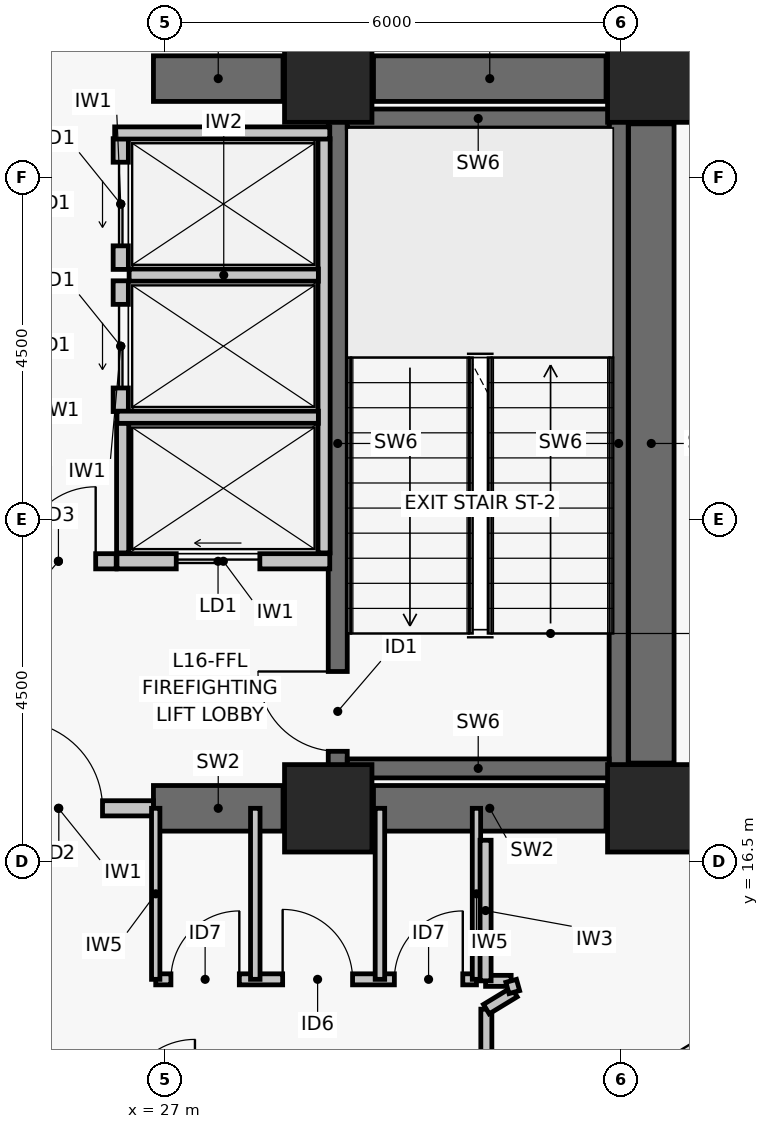
"""IFC4 building model, lengths in metres.
Left out: names, types, materials, properties, quantities, classifications, styles, units other than length and angle.
Written with IfcOpenShell. Run it as: python <this file> out.ifc"""

import sys

from ifc_helpers import new_model, si_unit, direction, frame, frame_2d, origin, origin_2d, place, context, subcontext, project, spatial, rectangle, extrude, element, fill, save


model = new_model("IFC4")
c1 = context("Model", 3, precision=1e-05, world=origin(), true_north=direction((0.0, 1.0)))
c2 = subcontext(c1, "Body", "Model", "MODEL_VIEW")
j1 = project(units=[si_unit("LENGTHUNIT", "METRE"), si_unit("PLANEANGLEUNIT", "RADIAN")], contexts=[c1])
p1 = place(None, origin())
s1 = spatial("IfcSite", under=j1, at=p1, CompositionType="ELEMENT")
p2 = place(p1, origin())
s2 = spatial("IfcBuilding", under=s1, at=p2, CompositionType="ELEMENT")
p3 = place(p2, frame((0.0, 0.0, 68.52)))
s3 = spatial("IfcBuildingStorey", under=s2, at=p3, CompositionType="ELEMENT", Elevation=68.52)
for number, where, z_axis, x_axis in (
    (1, (29.15, 17.2, 0.0), (0.0, 0.0, 1.0), (1.0, 0.0, 0.0)),
    (2, (33.4, 17.2, 0.0), (0.0, 0.0, 1.0), (1.0, 0.0, 0.0)),
    (3, (29.15, 26.8, 0.0), (0.0, 0.0, 1.0), (1.0, 0.0, 0.0)),
    (4, (33.4, 26.8, 0.0), (0.0, 0.0, 1.0), (1.0, 0.0, 0.0)),
):
    element("IfcColumn", number, at=place(p3, frame(where, z_axis=z_axis, x_axis=x_axis)), inside=s3, PredefinedType="COLUMN", context=c2, shape_type="SweptSolid", body=[
        extrude(rectangle(XDim=1.15, YDim=1.15, at=origin_2d()), origin(), (0.0, 0.0, 1.0), 3.72),
    ])
p4 = place(p3, frame((26.85, 17.2, 0.0), z_axis=(0.0, 0.0, 1.0), x_axis=(1.0, 0.0, 0.0)))
e5 = element("IfcWall", 5, at=p4, inside=s3, PredefinedType="SHEAR", context=c2, shape_type="SweptSolid", body=[
    extrude(rectangle(XDim=1.705, YDim=0.6, at=frame_2d((0.853, 0.0))), origin(), (0.0, 0.0, 1.0), 3.47),
])
p5 = place(p3, frame((29.745, 17.2, 0.0), z_axis=(0.0, 0.0, 1.0), x_axis=(1.0, 0.0, 0.0)))
e6 = element("IfcWall", 6, at=p5, inside=s3, PredefinedType="SHEAR", context=c2, shape_type="SweptSolid", body=[
    extrude(rectangle(XDim=3.06, YDim=0.6, at=frame_2d((1.53, 0.0))), origin(), (0.0, 0.0, 1.0), 3.47),
])
p6 = place(p3, frame((26.85, 26.8, 0.0), z_axis=(0.0, 0.0, 1.0), x_axis=(1.0, 0.0, 0.0)))
e7 = element("IfcWall", 7, at=p6, inside=s3, PredefinedType="SHEAR", context=c2, shape_type="SweptSolid", body=[
    extrude(rectangle(XDim=1.705, YDim=0.6, at=frame_2d((0.853, 0.0))), origin(), (0.0, 0.0, 1.0), 3.47),
])
p7 = place(p3, frame((29.745, 26.8, 0.0), z_axis=(0.0, 0.0, 1.0), x_axis=(1.0, 0.0, 0.0)))
e8 = element("IfcWall", 8, at=p7, inside=s3, PredefinedType="SHEAR", context=c2, shape_type="SweptSolid", body=[
    extrude(rectangle(XDim=3.06, YDim=0.6, at=frame_2d((1.53, 0.0))), origin(), (0.0, 0.0, 1.0), 3.47),
])
p8 = place(p3, frame((33.4, 17.795, 0.0), z_axis=(0.0, 0.0, 1.0), x_axis=(0.0, 1.0, 0.0)))
e9 = element("IfcWall", 9, at=p8, inside=s3, PredefinedType="SHEAR", context=c2, shape_type="SweptSolid", body=[
    extrude(rectangle(XDim=8.41, YDim=0.6, at=frame_2d((4.205, 0.0))), origin(), (0.0, 0.0, 1.0), 3.47),
])
p9 = place(p3, frame((29.275, 17.6, 0.0), z_axis=(0.0, 0.0, 1.0), x_axis=(0.0, 1.0, 0.0)))
e10 = element("IfcWall", 10, at=p9, inside=s3, PredefinedType="SHEAR", context=c2, shape_type="SweptSolid", body=[
    extrude(rectangle(XDim=8.8, YDim=0.25, at=frame_2d((4.4, 0.0))), origin(), (0.0, 0.0, 1.0), 3.47),
])
p10 = place(p9, frame((0.35, 0.0, 0.0)))
e11 = element("IfcOpeningElement", 11, at=p10, cuts=e10, PredefinedType="OPENING", context=c2, shape_type="SweptSolid", body=[
    extrude(rectangle(XDim=1.05, YDim=2.08, at=frame_2d((0.525, 1.04))), frame((0.0, 0.135, 0.0), z_axis=(0.0, -1.0, 0.0), x_axis=(1.0, 0.0, 0.0)), (0.0, 0.0, 1.0), 0.27),
])
p11 = place(p3, frame((32.971, 17.6, 0.0), z_axis=(0.0, 0.0, 1.0), x_axis=(0.0, 1.0, 0.0)))
e12 = element("IfcWall", 12, at=p11, inside=s3, PredefinedType="SHEAR", context=c2, shape_type="SweptSolid", body=[
    extrude(rectangle(XDim=8.8, YDim=0.25, at=frame_2d((4.4, 0.0))), origin(), (0.0, 0.0, 1.0), 3.47),
])
for number, where, z_axis, x_axis in (
    (13, (29.4, 17.725, 0.0), (0.0, 0.0, 1.0), (1.0, 0.0, 0.0)),
    (14, (29.4, 26.275, 0.0), (0.0, 0.0, 1.0), (1.0, 0.0, 0.0)),
):
    element("IfcWall", number, at=place(p3, frame(where, z_axis=z_axis, x_axis=x_axis)), inside=s3, PredefinedType="SHEAR", context=c2, shape_type="SweptSolid", body=[
        extrude(rectangle(XDim=3.446, YDim=0.25, at=frame_2d((1.723, 0.0))), origin(), (0.0, 0.0, 1.0), 3.47),
    ])
p12 = place(p3, frame((24.35, 17.2, 0.0), z_axis=(0.0, 0.0, 1.0), x_axis=(1.0, 0.0, 0.0)))
e15 = element("IfcWall", 15, at=p12, inside=s3, PredefinedType="PARTITIONING", context=c2, shape_type="SweptSolid", body=[
    extrude(rectangle(XDim=2.5, YDim=0.2, at=frame_2d((1.25, 0.0))), origin(), (0.0, 0.0, 1.0), 2.6),
])
p13 = place(p12, frame((0.68, 0.0, 0.0)))
e16 = element("IfcOpeningElement", 16, at=p13, cuts=e15, PredefinedType="OPENING", context=c2, shape_type="SweptSolid", body=[
    extrude(rectangle(XDim=1.15, YDim=2.08, at=frame_2d((0.575, 1.04))), frame((0.0, 0.11, 0.0), z_axis=(0.0, -1.0, 0.0), x_axis=(1.0, 0.0, 0.0)), (0.0, 0.0, 1.0), 0.22),
])
p14 = place(p3, frame((24.84, 20.45, 0.0), z_axis=(0.0, 0.0, 1.0), x_axis=(1.0, 0.0, 0.0)))
e17 = element("IfcWall", 17, at=p14, inside=s3, PredefinedType="PARTITIONING", context=c2, shape_type="SweptSolid", body=[
    extrude(rectangle(XDim=1.52, YDim=0.2, at=frame_2d((0.76, 0.0))), origin(), (0.0, 0.0, 1.0), 3.47),
])
p15 = place(p14, frame((0.27, 0.0, 0.0)))
e18 = element("IfcOpeningElement", 18, at=p15, cuts=e17, PredefinedType="OPENING", context=c2, shape_type="SweptSolid", body=[
    extrude(rectangle(XDim=0.98, YDim=2.06, at=frame_2d((0.49, 1.03))), frame((0.0, 0.11, 0.0), z_axis=(0.0, -1.0, 0.0), x_axis=(1.0, 0.0, 0.0)), (0.0, 0.0, 1.0), 0.22),
])
p16 = place(p3, frame((26.37, 20.45, 0.0), z_axis=(0.0, 0.0, 1.0), x_axis=(1.0, 0.0, 0.0)))
e19 = element("IfcWall", 19, at=p16, inside=s3, PredefinedType="PARTITIONING", context=c2, shape_type="SweptSolid", body=[
    extrude(rectangle(XDim=2.8, YDim=0.2, at=frame_2d((1.4, 0.0))), origin(), (0.0, 0.0, 1.0), 3.47),
])
p17 = place(p16, frame((0.78, 0.0, 0.0)))
e20 = element("IfcOpeningElement", 20, at=p17, cuts=e19, PredefinedType="OPENING", context=c2, shape_type="SweptSolid", body=[
    extrude(rectangle(XDim=1.1, YDim=2.08, at=frame_2d((0.55, 1.04))), frame((0.0, 0.11, 0.0), z_axis=(0.0, -1.0, 0.0), x_axis=(1.0, 0.0, 0.0)), (0.0, 0.0, 1.0), 0.22),
])
p18 = place(p3, frame((26.42, 22.42, 0.0), z_axis=(0.0, 0.0, 1.0), x_axis=(0.0, 1.0, 0.0)))
e21 = element("IfcWall", 21, at=p18, inside=s3, PredefinedType="PARTITIONING", context=c2, shape_type="SweptSolid", body=[
    extrude(rectangle(XDim=1.72, YDim=0.2, at=frame_2d((0.86, 0.0))), origin(), (0.0, 0.0, 1.0), 3.47),
])
p19 = place(p18, frame((0.31, 0.0, 0.0)))
e22 = element("IfcOpeningElement", 22, at=p19, cuts=e21, PredefinedType="OPENING", context=c2, shape_type="SweptSolid", body=[
    extrude(rectangle(XDim=1.1, YDim=2.08, at=frame_2d((0.55, 1.04))), frame((0.0, 0.11, 0.0), z_axis=(0.0, -1.0, 0.0), x_axis=(1.0, 0.0, 0.0)), (0.0, 0.0, 1.0), 0.22),
])
p20 = place(p3, frame((26.42, 24.29, 0.0), z_axis=(0.0, 0.0, 1.0), x_axis=(0.0, 1.0, 0.0)))
e23 = element("IfcWall", 23, at=p20, inside=s3, PredefinedType="PARTITIONING", context=c2, shape_type="SweptSolid", body=[
    extrude(rectangle(XDim=1.72, YDim=0.2, at=frame_2d((0.86, 0.0))), origin(), (0.0, 0.0, 1.0), 3.47),
])
p21 = place(p20, frame((0.31, 0.0, 0.0)))
e24 = element("IfcOpeningElement", 24, at=p21, cuts=e23, PredefinedType="OPENING", context=c2, shape_type="SweptSolid", body=[
    extrude(rectangle(XDim=1.1, YDim=2.08, at=frame_2d((0.55, 1.04))), frame((0.0, 0.11, 0.0), z_axis=(0.0, -1.0, 0.0), x_axis=(1.0, 0.0, 0.0)), (0.0, 0.0, 1.0), 0.22),
])
p22 = place(p3, frame((29.095, 20.56, 0.0), z_axis=(0.0, 0.0, 1.0), x_axis=(0.0, 1.0, 0.0)))
e25 = element("IfcWall", 25, at=p22, inside=s3, PredefinedType="PARTITIONING", context=c2, shape_type="SweptSolid", body=[
    extrude(rectangle(XDim=5.45, YDim=0.16, at=frame_2d((2.725, 0.0))), origin(), (0.0, 0.0, 1.0), 3.47),
])
p23 = place(p3, frame((26.445, 20.56, 0.0), z_axis=(0.0, 0.0, 1.0), x_axis=(0.0, 1.0, 0.0)))
e26 = element("IfcWall", 26, at=p23, inside=s3, PredefinedType="PARTITIONING", context=c2, shape_type="SweptSolid", body=[
    extrude(rectangle(XDim=1.71, YDim=0.16, at=frame_2d((0.855, 0.0))), origin(), (0.0, 0.0, 1.0), 3.47),
])
p24 = place(p3, frame((26.37, 22.345, 0.0), z_axis=(0.0, 0.0, 1.0), x_axis=(1.0, 0.0, 0.0)))
e27 = element("IfcWall", 27, at=p24, inside=s3, PredefinedType="PARTITIONING", context=c2, shape_type="SweptSolid", body=[
    extrude(rectangle(XDim=2.65, YDim=0.16, at=frame_2d((1.325, 0.0))), origin(), (0.0, 0.0, 1.0), 3.47),
])
p25 = place(p3, frame((26.53, 24.215, 0.0), z_axis=(0.0, 0.0, 1.0), x_axis=(1.0, 0.0, 0.0)))
e28 = element("IfcWall", 28, at=p25, inside=s3, PredefinedType="PARTITIONING", context=c2, shape_type="SweptSolid", body=[
    extrude(rectangle(XDim=2.49, YDim=0.16, at=frame_2d((1.245, 0.0))), origin(), (0.0, 0.0, 1.0), 3.47),
])
p26 = place(p3, frame((26.34, 26.085, 0.0), z_axis=(0.0, 0.0, 1.0), x_axis=(1.0, 0.0, 0.0)))
e29 = element("IfcWall", 29, at=p26, inside=s3, PredefinedType="PARTITIONING", context=c2, shape_type="SweptSolid", body=[
    extrude(rectangle(XDim=2.83, YDim=0.16, at=frame_2d((1.415, 0.0))), origin(), (0.0, 0.0, 1.0), 3.47),
])
p27 = place(p3, frame((26.88, 14.95, 0.0), z_axis=(0.0, 0.0, 1.0), x_axis=(1.0, 0.0, 0.0)))
e30 = element("IfcWall", 30, at=p27, inside=s3, PredefinedType="PARTITIONING", context=c2, shape_type="SweptSolid", body=[
    extrude(rectangle(XDim=4.22, YDim=0.145, at=frame_2d((2.11, 0.0))), origin(), (0.0, 0.0, 1.0), 3.47),
])
p28 = place(p27, frame((0.2, 0.0, 0.0)))
e31 = element("IfcOpeningElement", 31, at=p28, cuts=e30, PredefinedType="OPENING", context=c2, shape_type="SweptSolid", body=[
    extrude(rectangle(XDim=0.9, YDim=2.02, at=frame_2d((0.45, 1.01))), frame((0.0, 0.083, 0.0), z_axis=(0.0, -1.0, 0.0), x_axis=(1.0, 0.0, 0.0)), (0.0, 0.0, 1.0), 0.165),
])
p29 = place(p27, frame((1.67, 0.0, 0.0)))
e32 = element("IfcOpeningElement", 32, at=p29, cuts=e30, PredefinedType="OPENING", context=c2, shape_type="SweptSolid", body=[
    extrude(rectangle(XDim=0.92, YDim=2.05, at=frame_2d((0.46, 1.025))), frame((0.0, 0.083, 0.0), z_axis=(0.0, -1.0, 0.0), x_axis=(1.0, 0.0, 0.0)), (0.0, 0.0, 1.0), 0.165),
])
p30 = place(p27, frame((3.14, 0.0, 0.0)))
e33 = element("IfcOpeningElement", 33, at=p30, cuts=e30, PredefinedType="OPENING", context=c2, shape_type="SweptSolid", body=[
    extrude(rectangle(XDim=0.9, YDim=2.02, at=frame_2d((0.45, 1.01))), frame((0.0, 0.083, 0.0), z_axis=(0.0, -1.0, 0.0), x_axis=(1.0, 0.0, 0.0)), (0.0, 0.0, 1.0), 0.165),
])
p31 = place(p3, frame((26.88, 14.95, 0.0), z_axis=(0.0, 0.0, 1.0), x_axis=(0.0, 1.0, 0.0)))
e34 = element("IfcWall", 34, at=p31, inside=s3, PredefinedType="PARTITIONING", context=c2, shape_type="SweptSolid", body=[
    extrude(rectangle(XDim=2.25, YDim=0.11, at=frame_2d((1.125, 0.0))), origin(), (0.0, 0.0, 1.0), 2.6),
])
for number, where, z_axis, x_axis in (
    (35, (28.19, 14.95, 0.0), (0.0, 0.0, 1.0), (0.0, 1.0, 0.0)),
    (36, (29.83, 14.95, 0.0), (0.0, 0.0, 1.0), (0.0, 1.0, 0.0)),
):
    element("IfcWall", number, at=place(p3, frame(where, z_axis=z_axis, x_axis=x_axis)), inside=s3, PredefinedType="PARTITIONING", context=c2, shape_type="SweptSolid", body=[
        extrude(rectangle(XDim=2.25, YDim=0.125, at=frame_2d((1.125, 0.0))), origin(), (0.0, 0.0, 1.0), 2.6),
    ])
p32 = place(p3, frame((31.1, 14.95, 0.0), z_axis=(0.0, 0.0, 1.0), x_axis=(0.0, 1.0, 0.0)))
e37 = element("IfcWall", 37, at=p32, inside=s3, PredefinedType="PARTITIONING", context=c2, shape_type="SweptSolid", body=[
    extrude(rectangle(XDim=2.25, YDim=0.11, at=frame_2d((1.125, 0.0))), origin(), (0.0, 0.0, 1.0), 2.6),
])
p33 = place(p3, frame((31.23, 13.29, 0.0), z_axis=(0.0, 0.0, 1.0), x_axis=(0.0, 1.0, 0.0)))
e38 = element("IfcWall", 38, at=p33, inside=s3, PredefinedType="PARTITIONING", context=c2, shape_type="SweptSolid", body=[
    extrude(rectangle(XDim=1.268, YDim=0.145, at=frame_2d((0.634, 0.0))), origin(), (0.0, 0.0, 1.0), 2.85),
])
p34 = place(p3, frame((31.23, 14.558, 0.0), z_axis=(0.0, 0.0, 1.0), x_axis=(0.854931196424, 0.518741408971, 0.0)))
e39 = element("IfcWall", 39, at=p34, inside=s3, PredefinedType="PARTITIONING", context=c2, shape_type="SweptSolid", body=[
    extrude(rectangle(XDim=0.431, YDim=0.145, at=frame_2d((0.215, 0.0))), origin(), (0.0, 0.0, 1.0), 3.47),
])
p35 = place(p3, frame((31.557, 14.93, 0.0), z_axis=(0.0, 0.0, 1.0), x_axis=(-1.0, 0.0, 0.0)))
e40 = element("IfcWall", 40, at=p35, inside=s3, PredefinedType="PARTITIONING", context=c2, shape_type="SweptSolid", body=[
    extrude(rectangle(XDim=0.337, YDim=0.145, at=frame_2d((0.168, 0.0))), origin(), (0.0, 0.0, 1.0), 3.47),
])
p36 = place(p3, frame((31.22, 14.93, 0.0), z_axis=(0.0, 0.0, 1.0), x_axis=(0.0, 1.0, 0.0)))
e41 = element("IfcWall", 41, at=p36, inside=s3, PredefinedType="PARTITIONING", context=c2, shape_type="SweptSolid", body=[
    extrude(rectangle(XDim=1.85, YDim=0.145, at=frame_2d((0.925, 0.0))), origin(), (0.0, 0.0, 1.0), 2.6),
])
p37 = place(p3, frame((33.74, 27.22, 0.0), z_axis=(0.0, 0.0, 1.0), x_axis=(-1.0, 0.0, 0.0)))
e42 = element("IfcWall", 42, at=p37, inside=s3, PredefinedType="PARTITIONING", context=c2, shape_type="SweptSolid", body=[
    extrude(rectangle(XDim=0.86, YDim=0.145, at=frame_2d((0.43, 0.0))), origin(), (0.0, 0.0, 1.0), 2.2),
])
p38 = place(p3, frame((31.598, 14.781, 0.0), z_axis=(0.0, 0.0, 1.0), x_axis=(-0.269277388617, 0.963062660464, 0.0)))
e43 = element("IfcWall", 43, at=p38, inside=s3, PredefinedType="PARTITIONING", context=c2, shape_type="SweptSolid", body=[
    extrude(rectangle(XDim=0.154, YDim=0.145, at=frame_2d((0.077, 0.0))), origin(), (0.0, 0.0, 1.0), 3.47),
])
p39 = place(p10, origin())
e44 = element("IfcDoor", 44, at=p39, inside=s3, OperationType="SINGLE_SWING_RIGHT", PredefinedType="DOOR", context=c2, shape_type="SweptSolid", body=[
    extrude(rectangle(XDim=1.05, YDim=2.08, at=frame_2d((0.525, 1.04))), frame((0.0, 0.025, 0.0), z_axis=(0.0, -1.0, 0.0), x_axis=(1.0, 0.0, 0.0)), (0.0, 0.0, 1.0), 0.05),
])
fill(e11, e44)
p40 = place(p13, origin())
e45 = element("IfcDoor", 45, at=p40, inside=s3, OperationType="SINGLE_SWING_LEFT", PredefinedType="DOOR", context=c2, shape_type="SweptSolid", body=[
    extrude(rectangle(XDim=1.15, YDim=2.08, at=frame_2d((0.575, 1.04))), frame((0.0, 0.025, 0.0), z_axis=(0.0, -1.0, 0.0), x_axis=(1.0, 0.0, 0.0)), (0.0, 0.0, 1.0), 0.05),
])
fill(e16, e45)
p41 = place(p15, origin())
e46 = element("IfcDoor", 46, at=p41, inside=s3, OperationType="SINGLE_SWING_RIGHT", PredefinedType="DOOR", context=c2, shape_type="SweptSolid", body=[
    extrude(rectangle(XDim=0.98, YDim=2.06, at=frame_2d((0.49, 1.03))), frame((0.0, 0.025, 0.0), z_axis=(0.0, -1.0, 0.0), x_axis=(1.0, 0.0, 0.0)), (0.0, 0.0, 1.0), 0.05),
])
fill(e18, e46)
p42 = place(p17, origin())
e47 = element("IfcDoor", 47, at=p42, inside=s3, OperationType="DOUBLE_DOOR_SLIDING", PredefinedType="DOOR", context=c2, shape_type="SweptSolid", body=[
    extrude(rectangle(XDim=1.1, YDim=2.08, at=frame_2d((0.55, 1.04))), frame((0.0, 0.025, 0.0), z_axis=(0.0, -1.0, 0.0), x_axis=(1.0, 0.0, 0.0)), (0.0, 0.0, 1.0), 0.05),
])
fill(e20, e47)
p43 = place(p19, origin())
e48 = element("IfcDoor", 48, at=p43, inside=s3, OperationType="DOUBLE_DOOR_SLIDING", PredefinedType="DOOR", context=c2, shape_type="SweptSolid", body=[
    extrude(rectangle(XDim=1.1, YDim=2.08, at=frame_2d((0.55, 1.04))), frame((0.0, 0.025, 0.0), z_axis=(0.0, -1.0, 0.0), x_axis=(1.0, 0.0, 0.0)), (0.0, 0.0, 1.0), 0.05),
])
fill(e22, e48)
p44 = place(p21, origin())
e49 = element("IfcDoor", 49, at=p44, inside=s3, OperationType="DOUBLE_DOOR_SLIDING", PredefinedType="DOOR", context=c2, shape_type="SweptSolid", body=[
    extrude(rectangle(XDim=1.1, YDim=2.08, at=frame_2d((0.55, 1.04))), frame((0.0, 0.025, 0.0), z_axis=(0.0, -1.0, 0.0), x_axis=(1.0, 0.0, 0.0)), (0.0, 0.0, 1.0), 0.05),
])
fill(e24, e49)
p45 = place(p28, origin())
e50 = element("IfcDoor", 50, at=p45, inside=s3, OperationType="SINGLE_SWING_RIGHT", PredefinedType="DOOR", context=c2, shape_type="SweptSolid", body=[
    extrude(rectangle(XDim=0.9, YDim=2.02, at=frame_2d((0.45, 1.01))), frame((0.0, 0.025, 0.0), z_axis=(0.0, -1.0, 0.0), x_axis=(1.0, 0.0, 0.0)), (0.0, 0.0, 1.0), 0.05),
])
fill(e31, e50)
p46 = place(p29, origin())
e51 = element("IfcDoor", 51, at=p46, inside=s3, OperationType="SINGLE_SWING_LEFT", PredefinedType="DOOR", context=c2, shape_type="SweptSolid", body=[
    extrude(rectangle(XDim=0.92, YDim=2.05, at=frame_2d((0.46, 1.025))), frame((0.0, 0.025, 0.0), z_axis=(0.0, -1.0, 0.0), x_axis=(1.0, 0.0, 0.0)), (0.0, 0.0, 1.0), 0.05),
])
fill(e32, e51)
p47 = place(p30, origin())
e52 = element("IfcDoor", 52, at=p47, inside=s3, OperationType="SINGLE_SWING_RIGHT", PredefinedType="DOOR", context=c2, shape_type="SweptSolid", body=[
    extrude(rectangle(XDim=0.9, YDim=2.02, at=frame_2d((0.45, 1.01))), frame((0.0, 0.025, 0.0), z_axis=(0.0, -1.0, 0.0), x_axis=(1.0, 0.0, 0.0)), (0.0, 0.0, 1.0), 0.05),
])
fill(e33, e52)
save(model, sys.argv[1])
